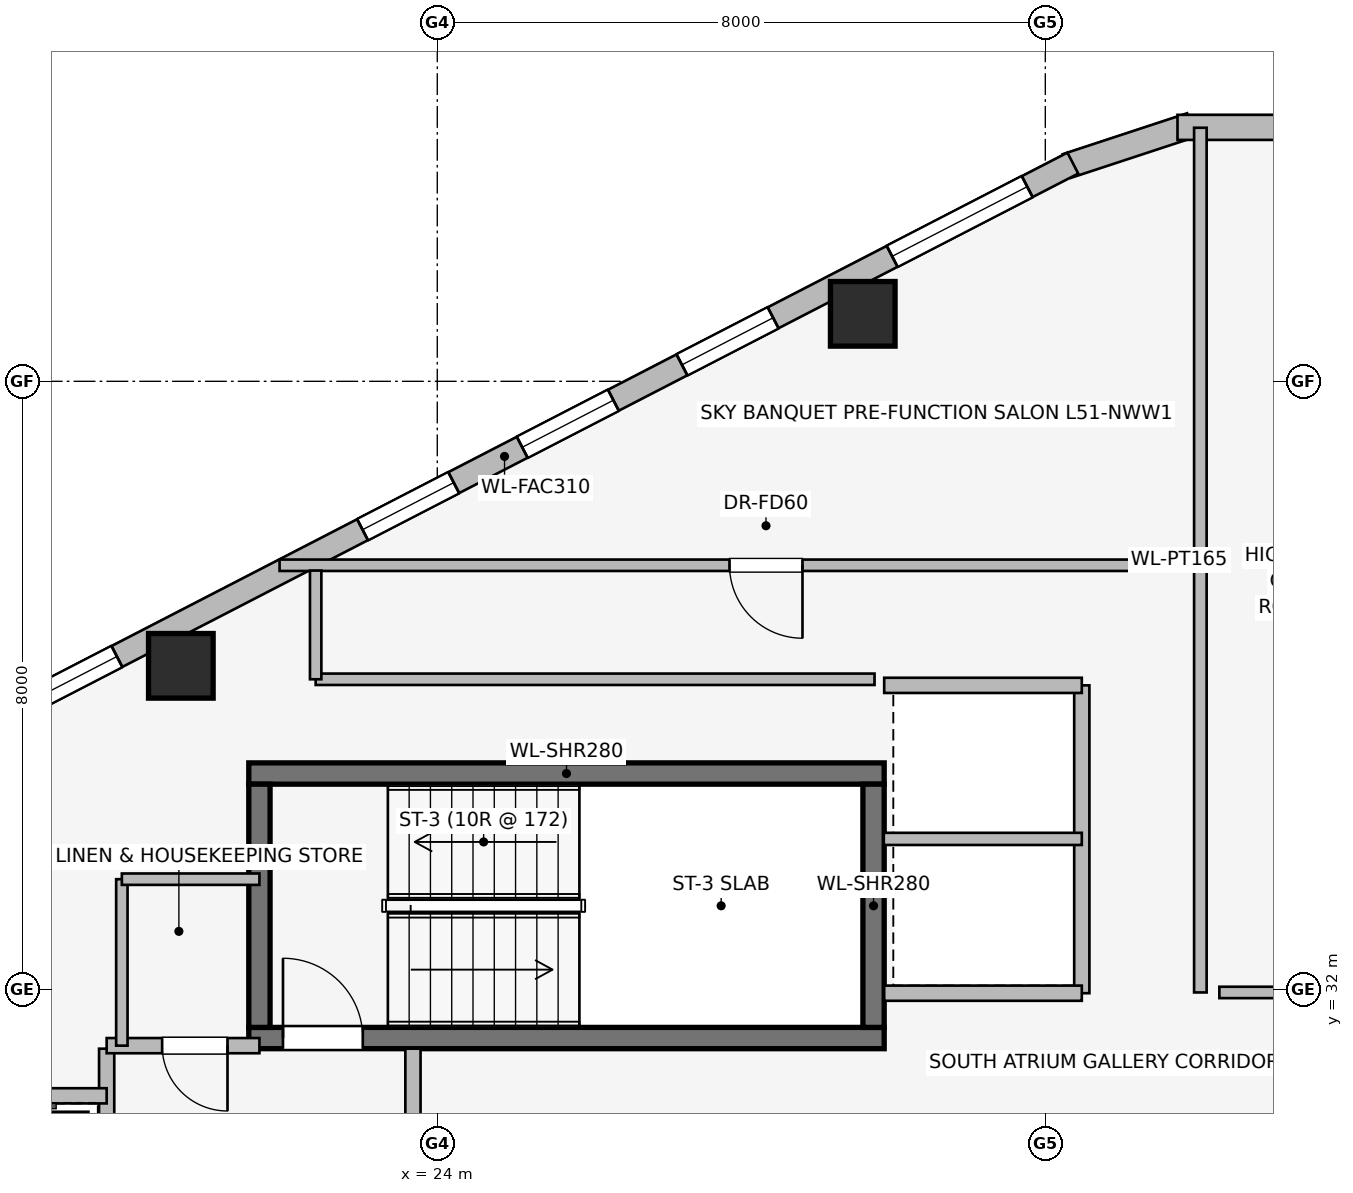
"""IFC4 building model, lengths in metres.
Left out: names, types, materials, properties, quantities, classifications, styles, units other than length and angle.
Written with IfcOpenShell. Run it as: python <this file> out.ifc"""

import sys

from ifc_helpers import new_model, si_unit, direction, frame, frame_2d, origin, origin_2d, place, context, subcontext, project, spatial, rectangle, extrude, element, fill, save


model = new_model("IFC4")
c1 = context("Model", 3, precision=1e-05, world=origin(), true_north=direction((0.0, 1.0)))
c2 = subcontext(c1, "Body", "Model", "MODEL_VIEW")
j1 = project(units=[si_unit("LENGTHUNIT", "METRE"), si_unit("PLANEANGLEUNIT", "RADIAN")], contexts=[c1])
p1 = place(None, origin())
s1 = spatial("IfcSite", under=j1, at=p1, CompositionType="ELEMENT")
p2 = place(p1, origin())
s2 = spatial("IfcBuilding", under=s1, at=p2, CompositionType="ELEMENT")
p3 = place(p2, frame((0.0, 0.0, 187.8)))
s3 = spatial("IfcBuildingStorey", under=s2, at=p3, CompositionType="ELEMENT", Elevation=187.8)
p4 = place(p3, frame((21.52, 31.36, 0.0), z_axis=(0.0, 0.0, 1.0), x_axis=(1.0, 0.0, 0.0)))
e1 = element("IfcWall", 1, at=p4, inside=s3, PredefinedType="SHEAR", context=c2, shape_type="SweptSolid", body=[
    extrude(rectangle(XDim=8.36, YDim=0.28, at=frame_2d((4.18, 0.0))), origin(), (0.0, 0.0, 1.0), 3.45),
])
p5 = place(p4, frame((0.45, 0.0, 0.0)))
e2 = element("IfcOpeningElement", 2, at=p5, cuts=e1, PredefinedType="OPENING", context=c2, shape_type="SweptSolid", body=[
    extrude(rectangle(XDim=1.05, YDim=2.0, at=frame_2d((0.525, 1.0))), frame((0.0, 0.15, 0.0), z_axis=(0.0, -1.0, 0.0), x_axis=(1.0, 0.0, 0.0)), (0.0, 0.0, 1.0), 0.3),
])
p6 = place(p3, frame((29.88, 34.84, 0.0), z_axis=(0.0, 0.0, 1.0), x_axis=(-1.0, 0.0, 0.0)))
e3 = element("IfcWall", 3, at=p6, inside=s3, PredefinedType="SHEAR", context=c2, shape_type="SweptSolid", body=[
    extrude(rectangle(XDim=8.36, YDim=0.28, at=frame_2d((4.18, 0.0))), origin(), (0.0, 0.0, 1.0), 3.45),
])
for number, where, z_axis, x_axis in (
    (4, (21.66, 34.7, 0.0), (0.0, 0.0, 1.0), (0.0, -1.0, 0.0)),
    (5, (29.74, 31.5, 0.0), (0.0, 0.0, 1.0), (0.0, 1.0, 0.0)),
):
    element("IfcWall", number, at=place(p3, frame(where, z_axis=z_axis, x_axis=x_axis)), inside=s3, PredefinedType="SHEAR", context=c2, shape_type="SweptSolid", body=[
        extrude(rectangle(XDim=3.2, YDim=0.28, at=frame_2d((1.6, 0.0))), origin(), (0.0, 0.0, 1.0), 3.45),
    ])
for number, where, z_axis, x_axis in (
    (6, (29.598, 40.888, 0.0), (0.0, 0.0, 1.0), (1.0, 0.0, 0.0)),
    (7, (20.626, 36.257, 0.0), (0.0, 0.0, 1.0), (1.0, 0.0, 0.0)),
):
    element("IfcColumn", number, at=place(p3, frame(where, z_axis=z_axis, x_axis=x_axis)), inside=s3, PredefinedType="COLUMN", context=c2, shape_type="SweptSolid", body=[
        extrude(rectangle(XDim=0.85, YDim=0.85, at=origin_2d()), origin(), (0.0, 0.0, 1.0), 3.45),
    ])
p7 = place(p3, frame((32.281, 42.832, 0.0), z_axis=(0.0, 0.0, 1.0), x_axis=(0.949937416267, 0.312440242569, 0.0)))
e8 = element("IfcWall", 8, at=p7, inside=s3, PredefinedType="STANDARD", context=c2, shape_type="SweptSolid", body=[
    extrude(rectangle(XDim=1.722, YDim=0.33, at=frame_2d((0.861, 0.0))), origin(), (0.0, 0.0, 1.0), 3.14),
])
p8 = place(p3, frame((33.739, 43.341, 0.0), z_axis=(0.0, 0.0, 1.0), x_axis=(1.0, 0.0, 0.0)))
e9 = element("IfcWall", 9, at=p8, inside=s3, PredefinedType="STANDARD", context=c2, shape_type="SweptSolid", body=[
    extrude(rectangle(XDim=1.722, YDim=0.33, at=frame_2d((0.861, 0.0))), origin(), (0.0, 0.0, 1.0), 3.14),
])
p9 = place(p3, frame((17.408, 35.153, 0.0), z_axis=(0.0, 0.0, 1.0), x_axis=(0.888626188278, 0.458632202867, 0.0)))
e10 = element("IfcWall", 10, at=p9, inside=s3, PredefinedType="STANDARD", context=c2, shape_type="SweptSolid", body=[
    extrude(rectangle(XDim=16.828, YDim=0.31, at=frame_2d((8.414, 0.0))), origin(), (0.0, 0.0, 1.0), 3.14),
])
p10 = place(p9, frame((0.675, 0.0, 0.75)))
e11 = element("IfcOpeningElement", 11, at=p10, cuts=e10, PredefinedType="OPENING", context=c2, shape_type="SweptSolid", body=[
    extrude(rectangle(XDim=2.0, YDim=1.5, at=frame_2d((1.0, 0.75))), frame((0.0, 0.165, 0.0), z_axis=(0.0, -1.0, 0.0), x_axis=(1.0, 0.0, 0.0)), (0.0, 0.0, 1.0), 0.33),
])
p11 = place(p9, frame((6.312, 0.0, 0.75)))
e12 = element("IfcOpeningElement", 12, at=p11, cuts=e10, PredefinedType="OPENING", context=c2, shape_type="SweptSolid", body=[
    extrude(rectangle(XDim=1.35, YDim=1.45, at=frame_2d((0.675, 0.725))), frame((0.0, 0.165, 0.0), z_axis=(0.0, -1.0, 0.0), x_axis=(1.0, 0.0, 0.0)), (0.0, 0.0, 1.0), 0.33),
])
p12 = place(p9, frame((8.676, 0.0, 0.75)))
e13 = element("IfcOpeningElement", 13, at=p12, cuts=e10, PredefinedType="OPENING", context=c2, shape_type="SweptSolid", body=[
    extrude(rectangle(XDim=1.35, YDim=1.45, at=frame_2d((0.675, 0.725))), frame((0.0, 0.165, 0.0), z_axis=(0.0, -1.0, 0.0), x_axis=(1.0, 0.0, 0.0)), (0.0, 0.0, 1.0), 0.33),
])
p13 = place(p9, frame((11.041, 0.0, 0.75)))
e14 = element("IfcOpeningElement", 14, at=p13, cuts=e10, PredefinedType="OPENING", context=c2, shape_type="SweptSolid", body=[
    extrude(rectangle(XDim=1.35, YDim=1.45, at=frame_2d((0.675, 0.725))), frame((0.0, 0.165, 0.0), z_axis=(0.0, -1.0, 0.0), x_axis=(1.0, 0.0, 0.0)), (0.0, 0.0, 1.0), 0.33),
])
p14 = place(p9, frame((14.153, 0.0, 0.75)))
e15 = element("IfcOpeningElement", 15, at=p14, cuts=e10, PredefinedType="OPENING", context=c2, shape_type="SweptSolid", body=[
    extrude(rectangle(XDim=2.0, YDim=1.5, at=frame_2d((1.0, 0.75))), frame((0.0, 0.165, 0.0), z_axis=(0.0, -1.0, 0.0), x_axis=(1.0, 0.0, 0.0)), (0.0, 0.0, 1.0), 0.33),
])
p15 = place(p3, frame((19.65, 25.68, 0.0), z_axis=(0.0, 0.0, 1.0), x_axis=(0.0, 1.0, 0.0)))
e16 = element("IfcWall", 16, at=p15, inside=s3, PredefinedType="PARTITIONING", context=c2, shape_type="SweptSolid", body=[
    extrude(rectangle(XDim=5.54, YDim=0.2, at=frame_2d((2.77, 0.0))), origin(), (0.0, 0.0, 1.0), 3.14),
])
p16 = place(p15, frame((0.62, 0.0, 0.0)))
e17 = element("IfcOpeningElement", 17, at=p16, cuts=e16, PredefinedType="OPENING", context=c2, shape_type="SweptSolid", body=[
    extrude(rectangle(XDim=1.1, YDim=2.2, at=frame_2d((0.55, 1.1))), frame((0.0, 0.11, 0.0), z_axis=(0.0, -1.0, 0.0), x_axis=(1.0, 0.0, 0.0)), (0.0, 0.0, 1.0), 0.22),
])
p17 = place(p15, frame((3.12, 0.0, 0.0)))
e18 = element("IfcOpeningElement", 18, at=p17, cuts=e16, PredefinedType="OPENING", context=c2, shape_type="SweptSolid", body=[
    extrude(rectangle(XDim=1.1, YDim=2.2, at=frame_2d((0.55, 1.1))), frame((0.0, 0.11, 0.0), z_axis=(0.0, -1.0, 0.0), x_axis=(1.0, 0.0, 0.0)), (0.0, 0.0, 1.0), 0.22),
])
p18 = place(p3, frame((23.68, 25.68, 0.0), z_axis=(0.0, 0.0, 1.0), x_axis=(0.0, 1.0, 0.0)))
e19 = element("IfcWall", 19, at=p18, inside=s3, PredefinedType="PARTITIONING", context=c2, shape_type="SweptSolid", body=[
    extrude(rectangle(XDim=5.54, YDim=0.2, at=frame_2d((2.77, 0.0))), origin(), (0.0, 0.0, 1.0), 3.14),
])
p19 = place(p18, frame((1.8, 0.0, 0.0)))
e20 = element("IfcOpeningElement", 20, at=p19, cuts=e19, PredefinedType="OPENING", context=c2, shape_type="SweptSolid", body=[
    extrude(rectangle(XDim=1.05, YDim=2.0, at=frame_2d((0.525, 1.0))), frame((0.0, 0.11, 0.0), z_axis=(0.0, -1.0, 0.0), x_axis=(1.0, 0.0, 0.0)), (0.0, 0.0, 1.0), 0.22),
])
p20 = place(p3, frame((21.66, 31.26, 0.0), z_axis=(0.0, 0.0, 1.0), x_axis=(-1.0, 0.0, 0.0)))
e21 = element("IfcWall", 21, at=p20, inside=s3, PredefinedType="PARTITIONING", context=c2, shape_type="SweptSolid", body=[
    extrude(rectangle(XDim=2.01, YDim=0.2, at=frame_2d((1.005, 0.0))), origin(), (0.0, 0.0, 1.0), 3.14),
])
p21 = place(p20, frame((0.42, 0.0, 0.0)))
e22 = element("IfcOpeningElement", 22, at=p21, cuts=e21, PredefinedType="OPENING", context=c2, shape_type="SweptSolid", body=[
    extrude(rectangle(XDim=0.86, YDim=2.0, at=frame_2d((0.43, 1.0))), frame((0.0, 0.11, 0.0), z_axis=(0.0, -1.0, 0.0), x_axis=(1.0, 0.0, 0.0)), (0.0, 0.0, 1.0), 0.22),
])
p22 = place(p3, frame((19.65, 30.6, 0.0), z_axis=(0.0, 0.0, 1.0), x_axis=(-1.0, 0.0, 0.0)))
e23 = element("IfcWall", 23, at=p22, inside=s3, PredefinedType="PARTITIONING", context=c2, shape_type="SweptSolid", body=[
    extrude(rectangle(XDim=2.5, YDim=0.2, at=frame_2d((1.25, 0.0))), origin(), (0.0, 0.0, 1.0), 2.04),
])
p23 = place(p3, frame((32.48, 31.95, 0.0), z_axis=(0.0, 0.0, 1.0), x_axis=(0.0, 1.0, 0.0)))
e24 = element("IfcWall", 24, at=p23, inside=s3, PredefinedType="PARTITIONING", context=c2, shape_type="SweptSolid", body=[
    extrude(rectangle(XDim=4.05, YDim=0.2, at=frame_2d((2.025, 0.0))), origin(), (0.0, 0.0, 1.0), 3.14),
])
for number, where, z_axis, x_axis in (
    (25, (29.88, 36.0, 0.0), (0.0, 0.0, 1.0), (1.0, 0.0, 0.0)),
    (26, (32.48, 31.95, 0.0), (0.0, 0.0, 1.0), (-1.0, 0.0, 0.0)),
):
    element("IfcWall", number, at=place(p3, frame(where, z_axis=z_axis, x_axis=x_axis)), inside=s3, PredefinedType="PARTITIONING", context=c2, shape_type="SweptSolid", body=[
        extrude(rectangle(XDim=2.6, YDim=0.2, at=frame_2d((1.3, 0.0))), origin(), (0.0, 0.0, 1.0), 3.14),
    ])
p24 = place(p3, frame((29.875, 33.98, 0.0), z_axis=(0.0, 0.0, 1.0), x_axis=(1.0, 0.0, 0.0)))
e27 = element("IfcWall", 27, at=p24, inside=s3, PredefinedType="PARTITIONING", context=c2, shape_type="SweptSolid", body=[
    extrude(rectangle(XDim=2.605, YDim=0.16, at=frame_2d((1.302, 0.0))), origin(), (0.0, 0.0, 1.0), 2.532),
])
p25 = place(p3, frame((19.85, 33.45, 0.0), z_axis=(0.0, 0.0, 1.0), x_axis=(0.0, -1.0, 0.0)))
e28 = element("IfcWall", 28, at=p25, inside=s3, PredefinedType="PARTITIONING", context=c2, shape_type="SweptSolid", body=[
    extrude(rectangle(XDim=2.19, YDim=0.15, at=frame_2d((1.095, 0.0))), origin(), (0.0, 0.0, 1.0), 3.14),
])
p26 = place(p3, frame((21.66, 33.45, 0.0), z_axis=(0.0, 0.0, 1.0), x_axis=(-1.0, 0.0, 0.0)))
e29 = element("IfcWall", 29, at=p26, inside=s3, PredefinedType="PARTITIONING", context=c2, shape_type="SweptSolid", body=[
    extrude(rectangle(XDim=1.81, YDim=0.15, at=frame_2d((0.905, 0.0))), origin(), (0.0, 0.0, 1.0), 3.14),
])
p27 = place(p3, frame((34.0, 37.58, 0.0), z_axis=(0.0, 0.0, 1.0), x_axis=(-1.0, 0.0, 0.0)))
e30 = element("IfcWall", 30, at=p27, inside=s3, PredefinedType="PARTITIONING", context=c2, shape_type="SweptSolid", body=[
    extrude(rectangle(XDim=12.075, YDim=0.15, at=frame_2d((6.038, 0.0))), origin(), (0.0, 0.0, 1.0), 2.532),
])
p28 = place(p27, frame((5.195, 0.0, 0.0)))
e31 = element("IfcOpeningElement", 31, at=p28, cuts=e30, PredefinedType="OPENING", context=c2, shape_type="SweptSolid", body=[
    extrude(rectangle(XDim=0.96, YDim=2.0, at=frame_2d((0.48, 1.0))), frame((0.0, 0.085, 0.0), z_axis=(0.0, -1.0, 0.0), x_axis=(1.0, 0.0, 0.0)), (0.0, 0.0, 1.0), 0.17),
])
p29 = place(p3, frame((34.04, 31.96, 0.0), z_axis=(0.0, 0.0, 1.0), x_axis=(0.0, 1.0, 0.0)))
e32 = element("IfcWall", 32, at=p29, inside=s3, PredefinedType="PARTITIONING", context=c2, shape_type="SweptSolid", body=[
    extrude(rectangle(XDim=11.376, YDim=0.165, at=frame_2d((5.688, 0.0))), origin(), (0.0, 0.0, 1.0), 3.14),
])
p30 = place(p3, frame((37.768, 31.96, 0.0), z_axis=(0.0, 0.0, 1.0), x_axis=(-1.0, 0.0, 0.0)))
e33 = element("IfcWall", 33, at=p30, inside=s3, PredefinedType="PARTITIONING", context=c2, shape_type="SweptSolid", body=[
    extrude(rectangle(XDim=3.478, YDim=0.15, at=frame_2d((1.739, 0.0))), origin(), (0.0, 0.0, 1.0), 3.14),
])
p31 = place(p30, frame((1.202, 0.0, 0.0)))
e34 = element("IfcOpeningElement", 34, at=p31, cuts=e33, PredefinedType="OPENING", context=c2, shape_type="SweptSolid", body=[
    extrude(rectangle(XDim=0.96, YDim=2.0, at=frame_2d((0.48, 1.0))), frame((0.0, 0.085, 0.0), z_axis=(0.0, -1.0, 0.0), x_axis=(1.0, 0.0, 0.0)), (0.0, 0.0, 1.0), 0.17),
])
p32 = place(p3, frame((29.753, 36.08, 0.0), z_axis=(0.0, 0.0, 1.0), x_axis=(-1.0, 0.0, 0.0)))
e35 = element("IfcWall", 35, at=p32, inside=s3, PredefinedType="PARTITIONING", context=c2, shape_type="SweptSolid", body=[
    extrude(rectangle(XDim=7.353, YDim=0.15, at=frame_2d((3.677, 0.0))), origin(), (0.0, 0.0, 1.0), 3.14),
])
p33 = place(p3, frame((22.4, 36.08, 0.0), z_axis=(0.0, 0.0, 1.0), x_axis=(0.0, 1.0, 0.0)))
e36 = element("IfcWall", 36, at=p33, inside=s3, PredefinedType="PARTITIONING", context=c2, shape_type="SweptSolid", body=[
    extrude(rectangle(XDim=1.43, YDim=0.15, at=frame_2d((0.715, 0.0))), origin(), (0.0, 0.0, 1.0), 3.14),
])
p34 = place(p10, origin())
e37 = element("IfcWindow", 37, at=p34, inside=s3, PartitioningType="SINGLE_PANEL", PredefinedType="WINDOW", context=c2, shape_type="SweptSolid", body=[
    extrude(rectangle(XDim=2.0, YDim=1.5, at=frame_2d((1.0, 0.75))), frame((0.0, 0.03, 0.0), z_axis=(0.0, -1.0, 0.0), x_axis=(1.0, 0.0, 0.0)), (0.0, 0.0, 1.0), 0.06),
])
fill(e11, e37)
p35 = place(p11, origin())
e38 = element("IfcWindow", 38, at=p35, inside=s3, PartitioningType="SINGLE_PANEL", PredefinedType="WINDOW", context=c2, shape_type="SweptSolid", body=[
    extrude(rectangle(XDim=1.35, YDim=1.45, at=frame_2d((0.675, 0.725))), frame((0.0, 0.03, 0.0), z_axis=(0.0, -1.0, 0.0), x_axis=(1.0, 0.0, 0.0)), (0.0, 0.0, 1.0), 0.06),
])
fill(e12, e38)
p36 = place(p12, origin())
e39 = element("IfcWindow", 39, at=p36, inside=s3, PartitioningType="SINGLE_PANEL", PredefinedType="WINDOW", context=c2, shape_type="SweptSolid", body=[
    extrude(rectangle(XDim=1.35, YDim=1.45, at=frame_2d((0.675, 0.725))), frame((0.0, 0.03, 0.0), z_axis=(0.0, -1.0, 0.0), x_axis=(1.0, 0.0, 0.0)), (0.0, 0.0, 1.0), 0.06),
])
fill(e13, e39)
p37 = place(p13, origin())
e40 = element("IfcWindow", 40, at=p37, inside=s3, PartitioningType="SINGLE_PANEL", PredefinedType="WINDOW", context=c2, shape_type="SweptSolid", body=[
    extrude(rectangle(XDim=1.35, YDim=1.45, at=frame_2d((0.675, 0.725))), frame((0.0, 0.03, 0.0), z_axis=(0.0, -1.0, 0.0), x_axis=(1.0, 0.0, 0.0)), (0.0, 0.0, 1.0), 0.06),
])
fill(e14, e40)
p38 = place(p14, origin())
e41 = element("IfcWindow", 41, at=p38, inside=s3, PartitioningType="SINGLE_PANEL", PredefinedType="WINDOW", context=c2, shape_type="SweptSolid", body=[
    extrude(rectangle(XDim=2.0, YDim=1.5, at=frame_2d((1.0, 0.75))), frame((0.0, 0.03, 0.0), z_axis=(0.0, -1.0, 0.0), x_axis=(1.0, 0.0, 0.0)), (0.0, 0.0, 1.0), 0.06),
])
fill(e15, e41)
p39 = place(p5, origin())
e42 = element("IfcDoor", 42, at=p39, inside=s3, OperationType="SINGLE_SWING_LEFT", PredefinedType="DOOR", context=c2, shape_type="SweptSolid", body=[
    extrude(rectangle(XDim=1.05, YDim=2.0, at=frame_2d((0.525, 1.0))), frame((0.0, 0.025, 0.0), z_axis=(0.0, -1.0, 0.0), x_axis=(1.0, 0.0, 0.0)), (0.0, 0.0, 1.0), 0.05),
])
fill(e2, e42)
p40 = place(p21, origin())
e43 = element("IfcDoor", 43, at=p40, inside=s3, OperationType="SINGLE_SWING_LEFT", PredefinedType="DOOR", context=c2, shape_type="SweptSolid", body=[
    extrude(rectangle(XDim=0.86, YDim=2.0, at=frame_2d((0.43, 1.0))), frame((0.0, 0.025, 0.0), z_axis=(0.0, -1.0, 0.0), x_axis=(1.0, 0.0, 0.0)), (0.0, 0.0, 1.0), 0.05),
])
fill(e22, e43)
p41 = place(p28, origin())
e44 = element("IfcDoor", 44, at=p41, inside=s3, OperationType="SINGLE_SWING_LEFT", PredefinedType="DOOR", context=c2, shape_type="SweptSolid", body=[
    extrude(rectangle(XDim=0.96, YDim=2.0, at=frame_2d((0.48, 1.0))), frame((0.0, 0.025, 0.0), z_axis=(0.0, -1.0, 0.0), x_axis=(1.0, 0.0, 0.0)), (0.0, 0.0, 1.0), 0.05),
])
fill(e31, e44)
save(model, sys.argv[1])
